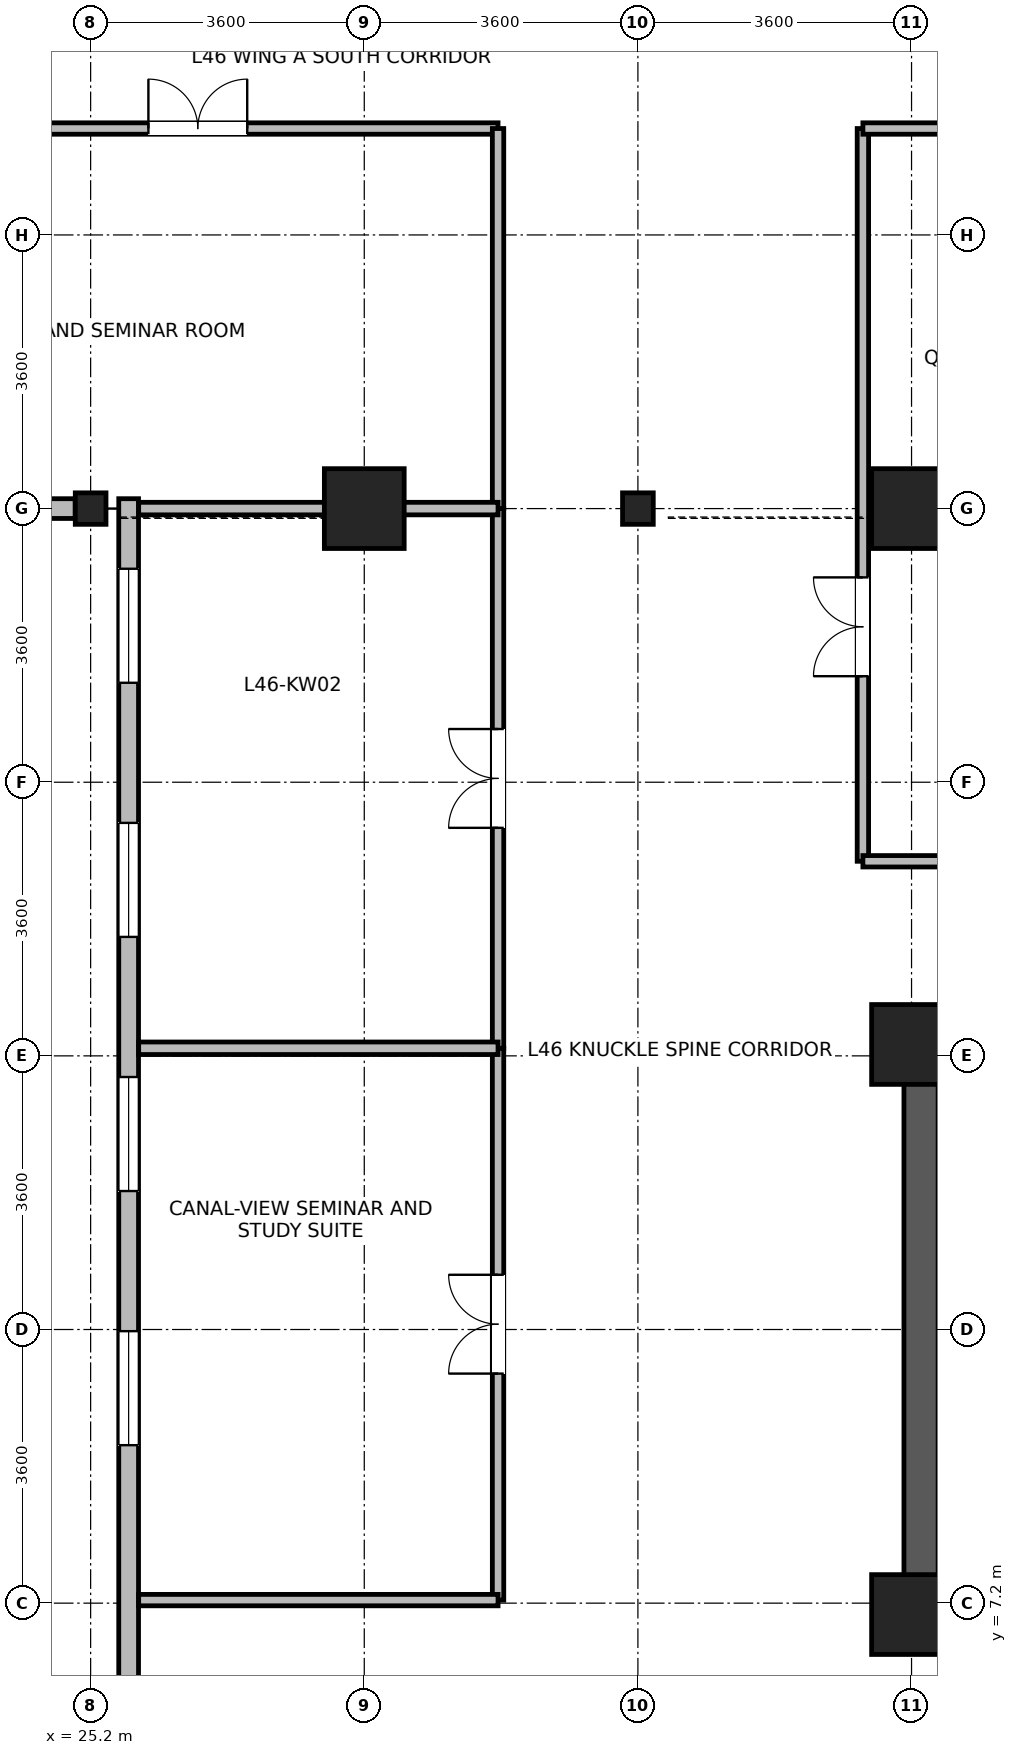
"""IFC4 building model, lengths in metres.
Left out: names, types, materials, properties, quantities, classifications, styles, units other than length and angle.
Written with IfcOpenShell. Run it as: python <this file> out.ifc"""

import sys

from ifc_helpers import new_model, si_unit, direction, frame, frame_2d, origin, origin_2d, place, context, subcontext, project, spatial, rectangle, i_section, extrude, source, transform, mapped, element, fill, save


model = new_model("IFC4")
c1 = context("Model", 3, precision=1e-05, world=origin(), true_north=direction((0.0, 1.0)))
c2 = subcontext(c1, "Body", "Model", "MODEL_VIEW")
j1 = project(units=[si_unit("LENGTHUNIT", "METRE"), si_unit("PLANEANGLEUNIT", "RADIAN")], contexts=[c1])
p1 = place(None, origin())
s1 = spatial("IfcSite", under=j1, at=p1, CompositionType="ELEMENT")
p2 = place(p1, origin())
s2 = spatial("IfcBuilding", under=s1, at=p2, CompositionType="ELEMENT")
p3 = place(p2, frame((0.0, 0.0, 180.9)))
s3 = spatial("IfcBuildingStorey", under=s2, at=p3, CompositionType="ELEMENT", Elevation=180.9)
p4 = place(p3, frame((36.125, 6.85, 0.0), z_axis=(0.0, 0.0, 1.0), x_axis=(0.0, 1.0, 0.0)))
e1 = element("IfcWall", 1, at=p4, inside=s3, PredefinedType="SHEAR", context=c2, shape_type="SweptSolid", body=[
    extrude(rectangle(XDim=7.9, YDim=0.45, at=frame_2d((3.95, 0.0))), origin(), (0.0, 0.0, 1.0), 3.46),
])
m1 = source(origin(), c2, "Body", "SweptSolid", [
    extrude(rectangle(XDim=1.05, YDim=1.05, at=origin_2d()), origin(), (0.0, 0.0, 1.0), 3.7),
])
for number, where, z_axis, x_axis in (
    (2, (28.8, 21.6, 0.0), (0.0, 0.0, 1.0), (1.0, 0.0, 0.0)),
    (3, (36.0, 21.6, 0.0), (0.0, 0.0, 1.0), (1.0, 0.0, 0.0)),
    (4, (36.0, 7.05, 0.0), (0.0, 0.0, 1.0), (1.0, 0.0, 0.0)),
    (5, (36.0, 14.55, 0.0), (0.0, 0.0, 1.0), (1.0, 0.0, 0.0)),
):
    element("IfcColumn", number, at=place(p3, frame(where, z_axis=z_axis, x_axis=x_axis)), inside=s3, PredefinedType="COLUMN", context=c2, shape_type="MappedRepresentation", body=[
        mapped(m1, transform((0.0, 0.0, 0.0), x_axis=(1.0, 0.0, 0.0), y_axis=(0.0, 1.0, 0.0), z_axis=(0.0, 0.0, 1.0), scale=1.0)),
    ])
m2 = source(origin(), c2, "Body", "SweptSolid", [
    extrude(i_section(OverallWidth=0.404, OverallDepth=0.414, WebThickness=0.021, FlangeThickness=0.028, FilletRadius=0.015, at=origin_2d()), origin(), (0.0, 0.0, 1.0), 3.7),
])
for number, where, z_axis, x_axis in (
    (6, (25.2, 21.6, 0.0), (0.0, 0.0, 1.0), (1.0, 0.0, 0.0)),
    (7, (32.4, 21.6, 0.0), (0.0, 0.0, 1.0), (1.0, 0.0, 0.0)),
):
    element("IfcColumn", number, at=place(p3, frame(where, z_axis=z_axis, x_axis=x_axis)), inside=s3, PredefinedType="COLUMN", context=c2, shape_type="MappedRepresentation", body=[
        mapped(m2, transform((0.0, 0.0, 0.0), x_axis=(1.0, 0.0, 0.0), y_axis=(0.0, 1.0, 0.0), z_axis=(0.0, 0.0, 1.0), scale=1.0)),
    ])
p5 = place(p3, frame((24.997, 21.6, 0.0), z_axis=(0.0, 0.0, 1.0), x_axis=(-1.0, 0.0, 0.0)))
e8 = element("IfcWall", 8, at=p5, inside=s3, PredefinedType="STANDARD", context=c2, shape_type="SweptSolid", body=[
    extrude(rectangle(XDim=2.871, YDim=0.26, at=frame_2d((1.436, 0.0))), origin(), (0.0, 0.0, 1.0), 2.99),
])
p6 = place(p5, frame((0.96, 0.0, 0.85)))
e9 = element("IfcOpeningElement", 9, at=p6, cuts=e8, PredefinedType="OPENING", context=c2, shape_type="SweptSolid", body=[
    extrude(rectangle(XDim=0.95, YDim=1.75, at=frame_2d((0.475, 0.875))), frame((0.0, 0.14, 0.0), z_axis=(0.0, -1.0, 0.0), x_axis=(1.0, 0.0, 0.0)), (0.0, 0.0, 1.0), 0.28),
])
p7 = place(p3, frame((25.7, 1.67, 0.0), z_axis=(0.0, 0.0, 1.0), x_axis=(0.0, 1.0, 0.0)))
e10 = element("IfcWall", 10, at=p7, inside=s3, PredefinedType="STANDARD", context=c2, shape_type="SweptSolid", body=[
    extrude(rectangle(XDim=20.06, YDim=0.26, at=frame_2d((10.03, 0.0))), origin(), (0.0, 0.0, 1.0), 3.44),
])
p8 = place(p7, frame((0.922, 0.0, 0.85)))
e11 = element("IfcOpeningElement", 11, at=p8, cuts=e10, PredefinedType="OPENING", context=c2, shape_type="SweptSolid", body=[
    extrude(rectangle(XDim=1.5, YDim=1.85, at=frame_2d((0.75, 0.925))), frame((0.0, 0.14, 0.0), z_axis=(0.0, -1.0, 0.0), x_axis=(1.0, 0.0, 0.0)), (0.0, 0.0, 1.0), 0.28),
])
p9 = place(p7, frame((7.608, 0.0, 0.85)))
e12 = element("IfcOpeningElement", 12, at=p9, cuts=e10, PredefinedType="OPENING", context=c2, shape_type="SweptSolid", body=[
    extrude(rectangle(XDim=1.5, YDim=1.85, at=frame_2d((0.75, 0.925))), frame((0.0, 0.14, 0.0), z_axis=(0.0, -1.0, 0.0), x_axis=(1.0, 0.0, 0.0)), (0.0, 0.0, 1.0), 0.28),
])
p10 = place(p7, frame((10.952, 0.0, 0.85)))
e13 = element("IfcOpeningElement", 13, at=p10, cuts=e10, PredefinedType="OPENING", context=c2, shape_type="SweptSolid", body=[
    extrude(rectangle(XDim=1.5, YDim=1.85, at=frame_2d((0.75, 0.925))), frame((0.0, 0.14, 0.0), z_axis=(0.0, -1.0, 0.0), x_axis=(1.0, 0.0, 0.0)), (0.0, 0.0, 1.0), 0.28),
])
p11 = place(p7, frame((14.295, 0.0, 0.85)))
e14 = element("IfcOpeningElement", 14, at=p11, cuts=e10, PredefinedType="OPENING", context=c2, shape_type="SweptSolid", body=[
    extrude(rectangle(XDim=1.5, YDim=1.85, at=frame_2d((0.75, 0.925))), frame((0.0, 0.14, 0.0), z_axis=(0.0, -1.0, 0.0), x_axis=(1.0, 0.0, 0.0)), (0.0, 0.0, 1.0), 0.28),
])
p12 = place(p7, frame((17.638, 0.0, 0.85)))
e15 = element("IfcOpeningElement", 15, at=p12, cuts=e10, PredefinedType="OPENING", context=c2, shape_type="SweptSolid", body=[
    extrude(rectangle(XDim=1.5, YDim=1.85, at=frame_2d((0.75, 0.925))), frame((0.0, 0.14, 0.0), z_axis=(0.0, -1.0, 0.0), x_axis=(1.0, 0.0, 0.0)), (0.0, 0.0, 1.0), 0.28),
])
p13 = place(p3, frame((35.36, 16.96, 0.0), z_axis=(0.0, 0.0, 1.0), x_axis=(0.0, 1.0, 0.0)))
e16 = element("IfcWall", 16, at=p13, inside=s3, PredefinedType="PARTITIONING", context=c2, shape_type="SweptSolid", body=[
    extrude(rectangle(XDim=9.64, YDim=0.15, at=frame_2d((4.82, 0.0))), origin(), (0.0, 0.0, 1.0), 3.44),
])
p14 = place(p13, frame((2.435, 0.0, 0.0)))
e17 = element("IfcOpeningElement", 17, at=p14, cuts=e16, PredefinedType="OPENING", context=c2, shape_type="SweptSolid", body=[
    extrude(rectangle(XDim=1.3, YDim=2.12, at=frame_2d((0.65, 1.06))), frame((0.0, 0.085, 0.0), z_axis=(0.0, -1.0, 0.0), x_axis=(1.0, 0.0, 0.0)), (0.0, 0.0, 1.0), 0.17),
])
p15 = place(p3, frame((22.66, 26.6, 0.0), z_axis=(0.0, 0.0, 1.0), x_axis=(1.0, 0.0, 0.0)))
e18 = element("IfcWall", 18, at=p15, inside=s3, PredefinedType="PARTITIONING", context=c2, shape_type="SweptSolid", body=[
    extrude(rectangle(XDim=7.9, YDim=0.15, at=frame_2d((3.95, 0.0))), origin(), (0.0, 0.0, 1.0), 3.44),
])
p16 = place(p15, frame((3.3, 0.0, 0.0)))
e19 = element("IfcOpeningElement", 19, at=p16, cuts=e18, PredefinedType="OPENING", context=c2, shape_type="SweptSolid", body=[
    extrude(rectangle(XDim=1.3, YDim=2.12, at=frame_2d((0.65, 1.06))), frame((0.0, 0.085, 0.0), z_axis=(0.0, -1.0, 0.0), x_axis=(1.0, 0.0, 0.0)), (0.0, 0.0, 1.0), 0.17),
])
p17 = place(p3, frame((30.56, 7.24, 0.0), z_axis=(0.0, 0.0, 1.0), x_axis=(0.0, 1.0, 0.0)))
e20 = element("IfcWall", 20, at=p17, inside=s3, PredefinedType="PARTITIONING", context=c2, shape_type="SweptSolid", body=[
    extrude(rectangle(XDim=7.26, YDim=0.15, at=frame_2d((3.63, 0.0))), origin(), (0.0, 0.0, 1.0), 3.44),
])
p18 = place(p17, frame((2.98, 0.0, 0.0)))
e21 = element("IfcOpeningElement", 21, at=p18, cuts=e20, PredefinedType="OPENING", context=c2, shape_type="SweptSolid", body=[
    extrude(rectangle(XDim=1.3, YDim=2.12, at=frame_2d((0.65, 1.06))), frame((0.0, 0.085, 0.0), z_axis=(0.0, -1.0, 0.0), x_axis=(1.0, 0.0, 0.0)), (0.0, 0.0, 1.0), 0.17),
])
p19 = place(p3, frame((30.56, 14.5, 0.0), z_axis=(0.0, 0.0, 1.0), x_axis=(0.0, 1.0, 0.0)))
e22 = element("IfcWall", 22, at=p19, inside=s3, PredefinedType="PARTITIONING", context=c2, shape_type="SweptSolid", body=[
    extrude(rectangle(XDim=7.1, YDim=0.15, at=frame_2d((3.55, 0.0))), origin(), (0.0, 0.0, 1.0), 3.44),
])
p20 = place(p19, frame((2.9, 0.0, 0.0)))
e23 = element("IfcOpeningElement", 23, at=p20, cuts=e22, PredefinedType="OPENING", context=c2, shape_type="SweptSolid", body=[
    extrude(rectangle(XDim=1.3, YDim=2.12, at=frame_2d((0.65, 1.06))), frame((0.0, 0.085, 0.0), z_axis=(0.0, -1.0, 0.0), x_axis=(1.0, 0.0, 0.0)), (0.0, 0.0, 1.0), 0.17),
])
for number, where, z_axis, x_axis in (
    (24, (35.36, 16.96, 0.0), (0.0, 0.0, 1.0), (1.0, 0.0, 0.0)),
    (25, (35.36, 26.6, 0.0), (0.0, 0.0, 1.0), (1.0, 0.0, 0.0)),
):
    element("IfcWall", number, at=place(p3, frame(where, z_axis=z_axis, x_axis=x_axis)), inside=s3, PredefinedType="PARTITIONING", context=c2, shape_type="SweptSolid", body=[
        extrude(rectangle(XDim=6.06, YDim=0.15, at=frame_2d((3.03, 0.0))), origin(), (0.0, 0.0, 1.0), 3.44),
    ])
p21 = place(p3, frame((30.56, 21.6, 0.0), z_axis=(0.0, 0.0, 1.0), x_axis=(0.0, 1.0, 0.0)))
e26 = element("IfcWall", 26, at=p21, inside=s3, PredefinedType="PARTITIONING", context=c2, shape_type="SweptSolid", body=[
    extrude(rectangle(XDim=5.0, YDim=0.15, at=frame_2d((2.5, 0.0))), origin(), (0.0, 0.0, 1.0), 3.44),
])
p22 = place(p3, frame((25.832, 7.24, 0.0), z_axis=(0.0, 0.0, 1.0), x_axis=(1.0, 0.0, 0.0)))
e27 = element("IfcWall", 27, at=p22, inside=s3, PredefinedType="PARTITIONING", context=c2, shape_type="SweptSolid", body=[
    extrude(rectangle(XDim=4.728, YDim=0.15, at=frame_2d((2.364, 0.0))), origin(), (0.0, 0.0, 1.0), 3.44),
])
p23 = place(p3, frame((25.832, 14.5, 0.0), z_axis=(0.0, 0.0, 1.0), x_axis=(1.0, 0.0, 0.0)))
e28 = element("IfcWall", 28, at=p23, inside=s3, PredefinedType="PARTITIONING", context=c2, shape_type="SweptSolid", body=[
    extrude(rectangle(XDim=4.728, YDim=0.165, at=frame_2d((2.364, 0.0))), origin(), (0.0, 0.0, 1.0), 3.44),
])
p24 = place(p3, frame((25.832, 21.6, 0.0), z_axis=(0.0, 0.0, 1.0), x_axis=(1.0, 0.0, 0.0)))
e29 = element("IfcWall", 29, at=p24, inside=s3, PredefinedType="PARTITIONING", context=c2, shape_type="SweptSolid", body=[
    extrude(rectangle(XDim=4.728, YDim=0.165, at=frame_2d((2.364, 0.0))), origin(), (0.0, 0.0, 1.0), 2.99),
])
p25 = place(p9, origin())
e30 = element("IfcWindow", 30, at=p25, inside=s3, PartitioningType="SINGLE_PANEL", PredefinedType="WINDOW", context=c2, shape_type="SweptSolid", body=[
    extrude(rectangle(XDim=1.5, YDim=1.85, at=frame_2d((0.75, 0.925))), frame((0.0, 0.03, 0.0), z_axis=(0.0, -1.0, 0.0), x_axis=(1.0, 0.0, 0.0)), (0.0, 0.0, 1.0), 0.06),
])
fill(e12, e30)
p26 = place(p10, origin())
e31 = element("IfcWindow", 31, at=p26, inside=s3, PartitioningType="SINGLE_PANEL", PredefinedType="WINDOW", context=c2, shape_type="SweptSolid", body=[
    extrude(rectangle(XDim=1.5, YDim=1.85, at=frame_2d((0.75, 0.925))), frame((0.0, 0.03, 0.0), z_axis=(0.0, -1.0, 0.0), x_axis=(1.0, 0.0, 0.0)), (0.0, 0.0, 1.0), 0.06),
])
fill(e13, e31)
p27 = place(p11, origin())
e32 = element("IfcWindow", 32, at=p27, inside=s3, PartitioningType="SINGLE_PANEL", PredefinedType="WINDOW", context=c2, shape_type="SweptSolid", body=[
    extrude(rectangle(XDim=1.5, YDim=1.85, at=frame_2d((0.75, 0.925))), frame((0.0, 0.03, 0.0), z_axis=(0.0, -1.0, 0.0), x_axis=(1.0, 0.0, 0.0)), (0.0, 0.0, 1.0), 0.06),
])
fill(e14, e32)
p28 = place(p12, origin())
e33 = element("IfcWindow", 33, at=p28, inside=s3, PartitioningType="SINGLE_PANEL", PredefinedType="WINDOW", context=c2, shape_type="SweptSolid", body=[
    extrude(rectangle(XDim=1.5, YDim=1.85, at=frame_2d((0.75, 0.925))), frame((0.0, 0.03, 0.0), z_axis=(0.0, -1.0, 0.0), x_axis=(1.0, 0.0, 0.0)), (0.0, 0.0, 1.0), 0.06),
])
fill(e15, e33)
p29 = place(p14, origin())
e34 = element("IfcDoor", 34, at=p29, inside=s3, OperationType="DOUBLE_DOOR_SINGLE_SWING", PredefinedType="DOOR", context=c2, shape_type="SweptSolid", body=[
    extrude(rectangle(XDim=1.3, YDim=2.12, at=frame_2d((0.65, 1.06))), frame((0.0, 0.025, 0.0), z_axis=(0.0, -1.0, 0.0), x_axis=(1.0, 0.0, 0.0)), (0.0, 0.0, 1.0), 0.05),
])
fill(e17, e34)
p30 = place(p16, origin())
e35 = element("IfcDoor", 35, at=p30, inside=s3, OperationType="DOUBLE_DOOR_SINGLE_SWING", PredefinedType="DOOR", context=c2, shape_type="SweptSolid", body=[
    extrude(rectangle(XDim=1.3, YDim=2.12, at=frame_2d((0.65, 1.06))), frame((0.0, 0.025, 0.0), z_axis=(0.0, -1.0, 0.0), x_axis=(1.0, 0.0, 0.0)), (0.0, 0.0, 1.0), 0.05),
])
fill(e19, e35)
p31 = place(p18, origin())
e36 = element("IfcDoor", 36, at=p31, inside=s3, OperationType="DOUBLE_DOOR_SINGLE_SWING", PredefinedType="DOOR", context=c2, shape_type="SweptSolid", body=[
    extrude(rectangle(XDim=1.3, YDim=2.12, at=frame_2d((0.65, 1.06))), frame((0.0, 0.025, 0.0), z_axis=(0.0, -1.0, 0.0), x_axis=(1.0, 0.0, 0.0)), (0.0, 0.0, 1.0), 0.05),
])
fill(e21, e36)
p32 = place(p20, origin())
e37 = element("IfcDoor", 37, at=p32, inside=s3, OperationType="DOUBLE_DOOR_SINGLE_SWING", PredefinedType="DOOR", context=c2, shape_type="SweptSolid", body=[
    extrude(rectangle(XDim=1.3, YDim=2.12, at=frame_2d((0.65, 1.06))), frame((0.0, 0.025, 0.0), z_axis=(0.0, -1.0, 0.0), x_axis=(1.0, 0.0, 0.0)), (0.0, 0.0, 1.0), 0.05),
])
fill(e23, e37)
save(model, sys.argv[1])
